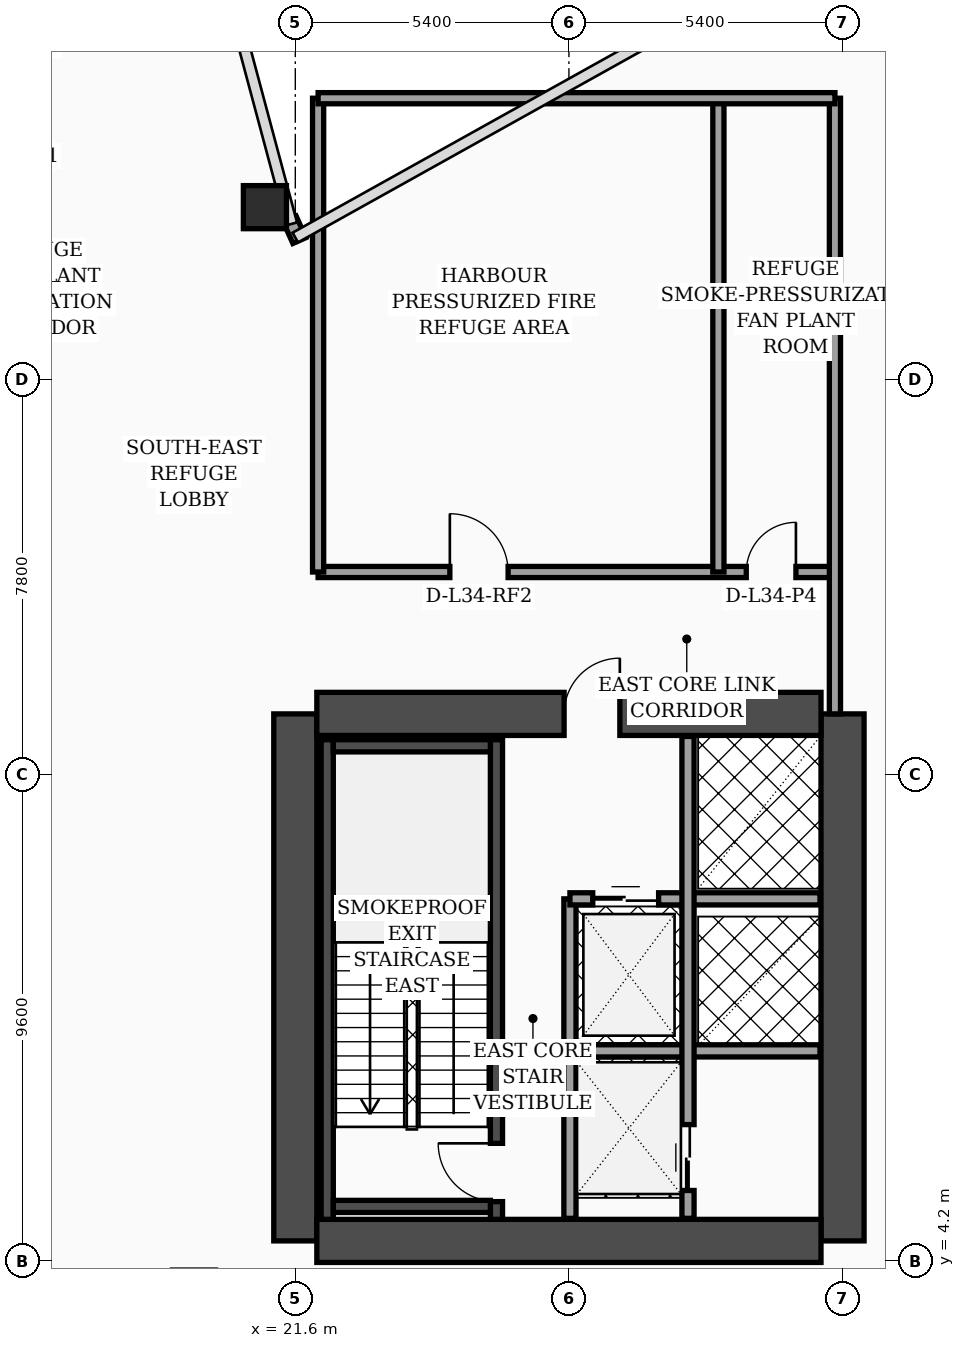
"""IFC4 building model, lengths in metres.
Left out: names, types, materials, properties, quantities, classifications, styles, units other than length and angle.
Written with IfcOpenShell. Run it as: python <this file> out.ifc"""

import sys

from ifc_helpers import new_model, si_unit, direction, frame, frame_2d, origin, origin_2d, place, context, subcontext, project, spatial, rectangle, hollow_rectangle, extrude, element, fill, save


model = new_model("IFC4")
c1 = context("Model", 3, precision=1e-05, world=origin(), true_north=direction((0.0, 1.0)))
c2 = subcontext(c1, "Body", "Model", "MODEL_VIEW")
j1 = project(units=[si_unit("LENGTHUNIT", "METRE"), si_unit("PLANEANGLEUNIT", "RADIAN")], contexts=[c1])
p1 = place(None, origin())
s1 = spatial("IfcSite", under=j1, at=p1, CompositionType="ELEMENT")
p2 = place(p1, origin())
s2 = spatial("IfcBuilding", under=s1, at=p2, CompositionType="ELEMENT")
p3 = place(p2, frame((0.0, 0.0, 139.2)))
s3 = spatial("IfcBuildingStorey", under=s2, at=p3, CompositionType="ELEMENT", Elevation=139.2)
for number, where, z_axis, x_axis in (
    (1, (21.6, 4.6, 0.0), (0.0, 0.0, 1.0), (0.0, 1.0, 0.0)),
    (2, (32.4, 4.6, 0.0), (0.0, 0.0, 1.0), (0.0, 1.0, 0.0)),
):
    element("IfcWall", number, at=place(p3, frame(where, z_axis=z_axis, x_axis=x_axis)), inside=s3, PredefinedType="SHEAR", context=c2, shape_type="SweptSolid", body=[
        extrude(rectangle(XDim=10.4, YDim=0.85, at=frame_2d((5.2, 0.0))), origin(), (0.0, 0.0, 1.0), 4.56),
    ])
p4 = place(p3, frame((22.025, 15.0, 0.0), z_axis=(0.0, 0.0, 1.0), x_axis=(1.0, 0.0, 0.0)))
e3 = element("IfcWall", 3, at=p4, inside=s3, PredefinedType="SHEAR", context=c2, shape_type="SweptSolid", body=[
    extrude(rectangle(XDim=9.95, YDim=0.85, at=frame_2d((4.975, 0.0))), origin(), (0.0, 0.0, 1.0), 4.56),
])
p5 = place(p4, frame((4.88, 0.0, 0.0)))
e4 = element("IfcOpeningElement", 4, at=p5, cuts=e3, PredefinedType="OPENING", context=c2, shape_type="SweptSolid", body=[
    extrude(rectangle(XDim=1.1, YDim=2.2, at=frame_2d((0.55, 1.1))), frame((0.0, 0.435, 0.0), z_axis=(0.0, -1.0, 0.0), x_axis=(1.0, 0.0, 0.0)), (0.0, 0.0, 1.0), 0.87),
])
p6 = place(p3, frame((22.025, 4.6, 0.0), z_axis=(0.0, 0.0, 1.0), x_axis=(1.0, 0.0, 0.0)))
e5 = element("IfcWall", 5, at=p6, inside=s3, PredefinedType="SHEAR", context=c2, shape_type="SweptSolid", body=[
    extrude(rectangle(XDim=9.95, YDim=0.85, at=frame_2d((4.975, 0.0))), origin(), (0.0, 0.0, 1.0), 4.56),
])
p7 = place(p3, frame((22.23, 5.025, 0.0), z_axis=(0.0, 0.0, 1.0), x_axis=(0.0, 1.0, 0.0)))
e6 = element("IfcWall", 6, at=p7, inside=s3, PredefinedType="SOLIDWALL", context=c2, shape_type="SweptSolid", body=[
    extrude(rectangle(XDim=9.465, YDim=0.24, at=frame_2d((4.732, 0.0))), origin(), (0.0, 0.0, 1.0), 4.56),
])
p8 = place(p3, frame((25.57, 5.025, 0.0), z_axis=(0.0, 0.0, 1.0), x_axis=(0.0, 1.0, 0.0)))
e7 = element("IfcWall", 7, at=p8, inside=s3, PredefinedType="SOLIDWALL", context=c2, shape_type="SweptSolid", body=[
    extrude(rectangle(XDim=9.465, YDim=0.24, at=frame_2d((4.732, 0.0))), origin(), (0.0, 0.0, 1.0), 4.56),
])
p9 = place(p8, frame((0.35, 0.0, 0.0)))
e8 = element("IfcOpeningElement", 8, at=p9, cuts=e7, PredefinedType="OPENING", context=c2, shape_type="SweptSolid", body=[
    extrude(rectangle(XDim=1.15, YDim=2.2, at=frame_2d((0.575, 1.1))), frame((0.0, 0.13, 0.0), z_axis=(0.0, -1.0, 0.0), x_axis=(1.0, 0.0, 0.0)), (0.0, 0.0, 1.0), 0.26),
])
for number, where, z_axis, x_axis in (
    (9, (22.35, 5.28, 0.0), (0.0, 0.0, 1.0), (1.0, 0.0, 0.0)),
    (10, (22.35, 14.37, 0.0), (0.0, 0.0, 1.0), (1.0, 0.0, 0.0)),
):
    element("IfcWall", number, at=place(p3, frame(where, z_axis=z_axis, x_axis=x_axis)), inside=s3, PredefinedType="SOLIDWALL", context=c2, shape_type="SweptSolid", body=[
        extrude(rectangle(XDim=3.1, YDim=0.24, at=frame_2d((1.55, 0.0))), origin(), (0.0, 0.0, 1.0), 4.56),
    ])
p10 = place(p3, frame((21.0, 25.0, 0.0), z_axis=(0.0, 0.0, 1.0), x_axis=(1.0, 0.0, 0.0)))
e11 = element("IfcColumn", 11, at=p10, inside=s3, PredefinedType="COLUMN", context=c2, shape_type="SweptSolid", body=[
    extrude(hollow_rectangle(XDim=0.85, YDim=0.85, WallThickness=0.036, at=origin_2d()), origin(), (0.0, 0.0, 1.0), 4.56),
])
p11 = place(p3, frame((21.68, 24.34, 0.0), z_axis=(0.0, 0.0, 1.0), x_axis=(-0.40758134973, 0.913168901875, 0.0)))
e12 = element("IfcWall", 12, at=p11, inside=s3, PredefinedType="SOLIDWALL", context=c2, shape_type="SweptSolid", body=[
    extrude(rectangle(XDim=0.471, YDim=0.28, at=frame_2d((0.235, 0.0))), origin(), (0.0, 0.0, 1.0), 4.56),
])
p12 = place(p3, frame((27.02, 5.045, 0.0), z_axis=(0.0, 0.0, 1.0), x_axis=(0.0, 1.0, 0.0)))
e13 = element("IfcWall", 13, at=p12, inside=s3, PredefinedType="SOLIDWALL", context=c2, shape_type="SweptSolid", body=[
    extrude(rectangle(XDim=6.305, YDim=0.24, at=frame_2d((3.153, 0.0))), origin(), (0.0, 0.0, 1.0), 4.56),
])
p13 = place(p3, frame((27.02, 11.35, 0.0), z_axis=(0.0, 0.0, 1.0), x_axis=(1.0, 0.0, 0.0)))
e14 = element("IfcWall", 14, at=p13, inside=s3, PredefinedType="SOLIDWALL", context=c2, shape_type="SweptSolid", body=[
    extrude(rectangle(XDim=4.935, YDim=0.24, at=frame_2d((2.468, 0.0))), origin(), (0.0, 0.0, 1.0), 4.56),
])
p14 = place(p13, frame((0.45, 0.0, 0.0)))
e15 = element("IfcOpeningElement", 15, at=p14, cuts=e14, PredefinedType="OPENING", context=c2, shape_type="SweptSolid", body=[
    extrude(rectangle(XDim=1.3, YDim=2.35, at=frame_2d((0.65, 1.175))), frame((0.0, 0.13, 0.0), z_axis=(0.0, -1.0, 0.0), x_axis=(1.0, 0.0, 0.0)), (0.0, 0.0, 1.0), 0.26),
])
p15 = place(p3, frame((27.02, 8.35, 0.0), z_axis=(0.0, 0.0, 1.0), x_axis=(1.0, 0.0, 0.0)))
e16 = element("IfcWall", 16, at=p15, inside=s3, PredefinedType="SOLIDWALL", context=c2, shape_type="SweptSolid", body=[
    extrude(rectangle(XDim=4.935, YDim=0.24, at=frame_2d((2.468, 0.0))), origin(), (0.0, 0.0, 1.0), 4.56),
])
p16 = place(p3, frame((29.35, 5.045, 0.0), z_axis=(0.0, 0.0, 1.0), x_axis=(0.0, 1.0, 0.0)))
e17 = element("IfcWall", 17, at=p16, inside=s3, PredefinedType="SOLIDWALL", context=c2, shape_type="SweptSolid", body=[
    extrude(rectangle(XDim=9.51, YDim=0.24, at=frame_2d((4.755, 0.0))), origin(), (0.0, 0.0, 1.0), 4.56),
])
p17 = place(p16, frame((0.55, 0.0, 0.0)))
e18 = element("IfcOpeningElement", 18, at=p17, cuts=e17, PredefinedType="OPENING", context=c2, shape_type="SweptSolid", body=[
    extrude(rectangle(XDim=1.3, YDim=2.35, at=frame_2d((0.65, 1.175))), frame((0.0, 0.13, 0.0), z_axis=(0.0, -1.0, 0.0), x_axis=(1.0, 0.0, 0.0)), (0.0, 0.0, 1.0), 0.26),
])
p18 = place(p3, frame((22.05, 17.8, 0.0), z_axis=(0.0, 0.0, 1.0), x_axis=(1.0, 0.0, 0.0)))
e19 = element("IfcWall", 19, at=p18, inside=s3, PredefinedType="SOLIDWALL", context=c2, shape_type="SweptSolid", body=[
    extrude(rectangle(XDim=10.2, YDim=0.22, at=frame_2d((5.1, 0.0))), origin(), (0.0, 0.0, 1.0), 3.84),
])
p19 = place(p18, frame((2.6, 0.0, 0.0)))
e20 = element("IfcOpeningElement", 20, at=p19, cuts=e19, PredefinedType="OPENING", context=c2, shape_type="SweptSolid", body=[
    extrude(rectangle(XDim=1.15, YDim=2.2, at=frame_2d((0.575, 1.1))), frame((0.0, 0.12, 0.0), z_axis=(0.0, -1.0, 0.0), x_axis=(1.0, 0.0, 0.0)), (0.0, 0.0, 1.0), 0.24),
])
p20 = place(p18, frame((8.45, 0.0, 0.0)))
e21 = element("IfcOpeningElement", 21, at=p20, cuts=e19, PredefinedType="OPENING", context=c2, shape_type="SweptSolid", body=[
    extrude(rectangle(XDim=0.98, YDim=2.15, at=frame_2d((0.49, 1.075))), frame((0.0, 0.12, 0.0), z_axis=(0.0, -1.0, 0.0), x_axis=(1.0, 0.0, 0.0)), (0.0, 0.0, 1.0), 0.24),
])
p21 = place(p3, frame((29.95, 17.8, 0.0), z_axis=(0.0, 0.0, 1.0), x_axis=(0.0, 1.0, 0.0)))
e22 = element("IfcWall", 22, at=p21, inside=s3, PredefinedType="SOLIDWALL", context=c2, shape_type="SweptSolid", body=[
    extrude(rectangle(XDim=9.35, YDim=0.22, at=frame_2d((4.675, 0.0))), origin(), (0.0, 0.0, 1.0), 3.84),
])
p22 = place(p3, frame((22.05, 17.8, 0.0), z_axis=(0.0, 0.0, 1.0), x_axis=(0.0, 1.0, 0.0)))
e23 = element("IfcWall", 23, at=p22, inside=s3, PredefinedType="SOLIDWALL", context=c2, shape_type="SweptSolid", body=[
    extrude(rectangle(XDim=9.35, YDim=0.22, at=frame_2d((4.675, 0.0))), origin(), (0.0, 0.0, 1.0), 4.04),
])
p23 = place(p3, frame((32.25, 15.0, 0.0), z_axis=(0.0, 0.0, 1.0), x_axis=(0.0, 1.0, 0.0)))
e24 = element("IfcWall", 24, at=p23, inside=s3, PredefinedType="SOLIDWALL", context=c2, shape_type="SweptSolid", body=[
    extrude(rectangle(XDim=12.15, YDim=0.22, at=frame_2d((6.075, 0.0))), origin(), (0.0, 0.0, 1.0), 3.84),
])
p24 = place(p3, frame((22.05, 27.15, 0.0), z_axis=(0.0, 0.0, 1.0), x_axis=(1.0, 0.0, 0.0)))
e25 = element("IfcWall", 25, at=p24, inside=s3, PredefinedType="SOLIDWALL", context=c2, shape_type="SweptSolid", body=[
    extrude(rectangle(XDim=10.2, YDim=0.22, at=frame_2d((5.1, 0.0))), origin(), (0.0, 0.0, 1.0), 4.04),
])
p25 = place(p14, origin())
e26 = element("IfcDoor", 26, at=p25, inside=s3, OperationType="DOUBLE_DOOR_SLIDING", PredefinedType="DOOR", context=c2, shape_type="SweptSolid", body=[
    extrude(rectangle(XDim=1.3, YDim=2.35, at=frame_2d((0.65, 1.175))), frame((0.0, 0.025, 0.0), z_axis=(0.0, -1.0, 0.0), x_axis=(1.0, 0.0, 0.0)), (0.0, 0.0, 1.0), 0.05),
])
fill(e15, e26)
p26 = place(p17, origin())
e27 = element("IfcDoor", 27, at=p26, inside=s3, OperationType="DOUBLE_DOOR_SLIDING", PredefinedType="DOOR", context=c2, shape_type="SweptSolid", body=[
    extrude(rectangle(XDim=1.3, YDim=2.35, at=frame_2d((0.65, 1.175))), frame((0.0, 0.025, 0.0), z_axis=(0.0, -1.0, 0.0), x_axis=(1.0, 0.0, 0.0)), (0.0, 0.0, 1.0), 0.05),
])
fill(e18, e27)
p27 = place(p19, origin())
e28 = element("IfcDoor", 28, at=p27, inside=s3, OperationType="SINGLE_SWING_LEFT", PredefinedType="DOOR", context=c2, shape_type="SweptSolid", body=[
    extrude(rectangle(XDim=1.15, YDim=2.2, at=frame_2d((0.575, 1.1))), frame((0.0, 0.025, 0.0), z_axis=(0.0, -1.0, 0.0), x_axis=(1.0, 0.0, 0.0)), (0.0, 0.0, 1.0), 0.05),
])
fill(e20, e28)
p28 = place(p20, origin())
e29 = element("IfcDoor", 29, at=p28, inside=s3, OperationType="SINGLE_SWING_RIGHT", PredefinedType="DOOR", context=c2, shape_type="SweptSolid", body=[
    extrude(rectangle(XDim=0.98, YDim=2.15, at=frame_2d((0.49, 1.075))), frame((0.0, 0.025, 0.0), z_axis=(0.0, -1.0, 0.0), x_axis=(1.0, 0.0, 0.0)), (0.0, 0.0, 1.0), 0.05),
])
fill(e21, e29)
p29 = place(p9, origin())
e30 = element("IfcDoor", 30, at=p29, inside=s3, OperationType="SINGLE_SWING_RIGHT", PredefinedType="DOOR", context=c2, shape_type="SweptSolid", body=[
    extrude(rectangle(XDim=1.15, YDim=2.2, at=frame_2d((0.575, 1.1))), frame((0.0, 0.025, 0.0), z_axis=(0.0, -1.0, 0.0), x_axis=(1.0, 0.0, 0.0)), (0.0, 0.0, 1.0), 0.05),
])
fill(e8, e30)
p30 = place(p5, origin())
e31 = element("IfcDoor", 31, at=p30, inside=s3, OperationType="SINGLE_SWING_RIGHT", PredefinedType="DOOR", context=c2, shape_type="SweptSolid", body=[
    extrude(rectangle(XDim=1.1, YDim=2.2, at=frame_2d((0.55, 1.1))), frame((0.0, 0.025, 0.0), z_axis=(0.0, -1.0, 0.0), x_axis=(1.0, 0.0, 0.0)), (0.0, 0.0, 1.0), 0.05),
])
fill(e4, e31)
save(model, sys.argv[1])
